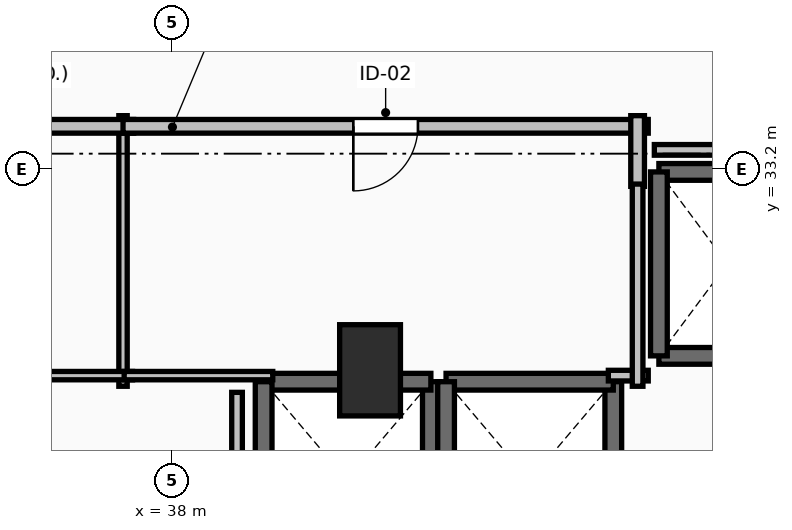
"""IFC4 building model, lengths in metres.
Left out: names, types, materials, properties, quantities, classifications, styles, units other than length and angle.
Written with IfcOpenShell. Run it as: python <this file> out.ifc"""

import sys

from ifc_helpers import new_model, si_unit, direction, frame, frame_2d, origin, origin_2d, place, context, subcontext, project, spatial, rectangle, extrude, element, fill, save


model = new_model("IFC4")
c1 = context("Model", 3, precision=1e-05, world=origin(), true_north=direction((0.0, 1.0)))
c2 = subcontext(c1, "Body", "Model", "MODEL_VIEW")
j1 = project(units=[si_unit("LENGTHUNIT", "METRE"), si_unit("PLANEANGLEUNIT", "RADIAN")], contexts=[c1])
p1 = place(None, origin())
s1 = spatial("IfcSite", under=j1, at=p1, CompositionType="ELEMENT")
p2 = place(p1, origin())
s2 = spatial("IfcBuilding", under=s1, at=p2, CompositionType="ELEMENT")
p3 = place(p2, frame((0.0, 0.0, 150.1)))
s3 = spatial("IfcBuildingStorey", under=s2, at=p3, CompositionType="ELEMENT", Elevation=150.1)
p4 = place(p3, frame((40.6, 30.55, 0.0), z_axis=(0.0, 0.0, 1.0), x_axis=(1.0, 0.0, 0.0)))
e1 = element("IfcColumn", 1, at=p4, inside=s3, PredefinedType="PILASTER", context=c2, shape_type="SweptSolid", body=[
    extrude(rectangle(XDim=0.8, YDim=1.2, at=origin_2d()), origin(), (0.0, 0.0, 1.0), 3.5),
])
p5 = place(p3, frame((41.4, 27.8, 0.0), z_axis=(0.0, 0.0, 1.0), x_axis=(0.0, 1.0, 0.0)))
e2 = element("IfcWall", 2, at=p5, inside=s3, PredefinedType="SOLIDWALL", context=c2, shape_type="SweptSolid", body=[
    extrude(rectangle(XDim=2.6, YDim=0.22, at=frame_2d((1.3, 0.0))), origin(), (0.0, 0.0, 1.0), 3.24),
])
p6 = place(p3, frame((41.4, 30.4, 0.0), z_axis=(0.0, 0.0, 1.0), x_axis=(-1.0, 0.0, 0.0)))
e3 = element("IfcWall", 3, at=p6, inside=s3, PredefinedType="SOLIDWALL", context=c2, shape_type="SweptSolid", body=[
    extrude(rectangle(XDim=2.2, YDim=0.22, at=frame_2d((1.1, 0.0))), origin(), (0.0, 0.0, 1.0), 3.24),
])
for number, where, z_axis, x_axis in (
    (4, (39.2, 30.4, 0.0), (0.0, 0.0, 1.0), (0.0, -1.0, 0.0)),
    (5, (43.8, 27.8, 0.0), (0.0, 0.0, 1.0), (0.0, 1.0, 0.0)),
):
    element("IfcWall", number, at=place(p3, frame(where, z_axis=z_axis, x_axis=x_axis)), inside=s3, PredefinedType="SOLIDWALL", context=c2, shape_type="SweptSolid", body=[
        extrude(rectangle(XDim=2.6, YDim=0.22, at=frame_2d((1.3, 0.0))), origin(), (0.0, 0.0, 1.0), 3.24),
    ])
p7 = place(p3, frame((43.8, 30.4, 0.0), z_axis=(0.0, 0.0, 1.0), x_axis=(-1.0, 0.0, 0.0)))
e6 = element("IfcWall", 6, at=p7, inside=s3, PredefinedType="SOLIDWALL", context=c2, shape_type="SweptSolid", body=[
    extrude(rectangle(XDim=2.2, YDim=0.22, at=frame_2d((1.1, 0.0))), origin(), (0.0, 0.0, 1.0), 3.24),
])
p8 = place(p3, frame((41.6, 30.4, 0.0), z_axis=(0.0, 0.0, 1.0), x_axis=(0.0, -1.0, 0.0)))
e7 = element("IfcWall", 7, at=p8, inside=s3, PredefinedType="SOLIDWALL", context=c2, shape_type="SweptSolid", body=[
    extrude(rectangle(XDim=2.6, YDim=0.22, at=frame_2d((1.3, 0.0))), origin(), (0.0, 0.0, 1.0), 3.24),
])
for number, where, z_axis, x_axis in (
    (8, (44.4, 30.74, 0.0), (0.0, 0.0, 1.0), (1.0, 0.0, 0.0)),
    (9, (46.2, 33.16, 0.0), (0.0, 0.0, 1.0), (-1.0, 0.0, 0.0)),
):
    element("IfcWall", number, at=place(p3, frame(where, z_axis=z_axis, x_axis=x_axis)), inside=s3, PredefinedType="SOLIDWALL", context=c2, shape_type="SweptSolid", body=[
        extrude(rectangle(XDim=1.8, YDim=0.22, at=frame_2d((0.9, 0.0))), origin(), (0.0, 0.0, 1.0), 3.24),
    ])
p9 = place(p3, frame((44.4, 33.16, 0.0), z_axis=(0.0, 0.0, 1.0), x_axis=(0.0, -1.0, 0.0)))
e10 = element("IfcWall", 10, at=p9, inside=s3, PredefinedType="SOLIDWALL", context=c2, shape_type="SweptSolid", body=[
    extrude(rectangle(XDim=2.42, YDim=0.22, at=frame_2d((1.21, 0.0))), origin(), (0.0, 0.0, 1.0), 3.24),
])
p10 = place(p3, frame((37.35, 30.34, 0.0), z_axis=(0.0, 0.0, 1.0), x_axis=(0.0, 1.0, 0.0)))
e11 = element("IfcWall", 11, at=p10, inside=s3, PredefinedType="PARTITIONING", context=c2, shape_type="SweptSolid", body=[
    extrude(rectangle(XDim=3.56, YDim=0.11, at=frame_2d((1.78, 0.0))), origin(), (0.0, 0.0, 1.0), 2.432),
])
p11 = place(p3, frame((33.36, 30.48, 0.0), z_axis=(0.0, 0.0, 1.0), x_axis=(1.0, 0.0, 0.0)))
e12 = element("IfcWall", 12, at=p11, inside=s3, PredefinedType="PARTITIONING", context=c2, shape_type="SweptSolid", body=[
    extrude(rectangle(XDim=4.115, YDim=0.11, at=frame_2d((2.058, 0.0))), origin(), (0.0, 0.0, 1.0), 2.432),
])
p12 = place(p3, frame((37.49, 33.76, 0.0), z_axis=(0.0, 0.0, 1.0), x_axis=(-1.0, 0.0, 0.0)))
e13 = element("IfcWall", 13, at=p12, inside=s3, PredefinedType="PARTITIONING", context=c2, shape_type="SweptSolid", body=[
    extrude(rectangle(XDim=4.13, YDim=0.18, at=frame_2d((2.065, 0.0))), origin(), (0.0, 0.0, 1.0), 3.24),
])
p13 = place(p12, frame((1.64, 0.0, 0.0)))
e14 = element("IfcOpeningElement", 14, at=p13, cuts=e13, PredefinedType="OPENING", context=c2, shape_type="SweptSolid", body=[
    extrude(rectangle(XDim=0.85, YDim=2.1, at=frame_2d((0.425, 1.05))), frame((0.0, 0.105, 0.0), z_axis=(0.0, -1.0, 0.0), x_axis=(1.0, 0.0, 0.0)), (0.0, 0.0, 1.0), 0.21),
])
p14 = place(p3, frame((37.365, 30.48, 0.0), z_axis=(0.0, 0.0, 1.0), x_axis=(1.0, 0.0, 0.0)))
e15 = element("IfcWall", 15, at=p14, inside=s3, PredefinedType="PARTITIONING", context=c2, shape_type="SweptSolid", body=[
    extrude(rectangle(XDim=1.955, YDim=0.11, at=frame_2d((0.978, 0.0))), origin(), (0.0, 0.0, 1.0), 2.432),
])
p15 = place(p3, frame((44.26, 33.76, 0.0), z_axis=(0.0, 0.0, 1.0), x_axis=(-1.0, 0.0, 0.0)))
e16 = element("IfcWall", 16, at=p15, inside=s3, PredefinedType="PARTITIONING", context=c2, shape_type="SweptSolid", body=[
    extrude(rectangle(XDim=6.91, YDim=0.18, at=frame_2d((3.455, 0.0))), origin(), (0.0, 0.0, 1.0), 3.24),
])
p16 = place(p15, frame((3.03, 0.0, 0.0)))
e17 = element("IfcOpeningElement", 17, at=p16, cuts=e16, PredefinedType="OPENING", context=c2, shape_type="SweptSolid", body=[
    extrude(rectangle(XDim=0.85, YDim=2.1, at=frame_2d((0.425, 1.05))), frame((0.0, 0.105, 0.0), z_axis=(0.0, -1.0, 0.0), x_axis=(1.0, 0.0, 0.0)), (0.0, 0.0, 1.0), 0.21),
])
p17 = place(p3, frame((44.12, 32.97, 0.0), z_axis=(0.0, 0.0, 1.0), x_axis=(0.0, 1.0, 0.0)))
e18 = element("IfcWall", 18, at=p17, inside=s3, PredefinedType="PARTITIONING", context=c2, shape_type="SweptSolid", body=[
    extrude(rectangle(XDim=0.93, YDim=0.18, at=frame_2d((0.465, 0.0))), origin(), (0.0, 0.0, 1.0), 3.24),
])
p18 = place(p3, frame((43.735, 30.48, 0.0), z_axis=(0.0, 0.0, 1.0), x_axis=(1.0, 0.0, 0.0)))
e19 = element("IfcWall", 19, at=p18, inside=s3, PredefinedType="PARTITIONING", context=c2, shape_type="SweptSolid", body=[
    extrude(rectangle(XDim=0.525, YDim=0.14, at=frame_2d((0.262, 0.0))), origin(), (0.0, 0.0, 1.0), 3.24),
])
p19 = place(p3, frame((44.12, 30.34, 0.0), z_axis=(0.0, 0.0, 1.0), x_axis=(0.0, 1.0, 0.0)))
e20 = element("IfcWall", 20, at=p19, inside=s3, PredefinedType="PARTITIONING", context=c2, shape_type="SweptSolid", body=[
    extrude(rectangle(XDim=2.66, YDim=0.14, at=frame_2d((1.33, 0.0))), origin(), (0.0, 0.0, 1.0), 3.24),
])
p20 = place(p3, frame((38.85, 27.87, 0.0), z_axis=(0.0, 0.0, 1.0), x_axis=(0.0, 1.0, 0.0)))
e21 = element("IfcWall", 21, at=p20, inside=s3, PredefinedType="PARTITIONING", context=c2, shape_type="SweptSolid", body=[
    extrude(rectangle(XDim=2.39, YDim=0.14, at=frame_2d((1.195, 0.0))), origin(), (0.0, 0.0, 1.0), 3.24),
])
p21 = place(p3, frame((48.55, 33.45, 0.0), z_axis=(0.0, 0.0, 1.0), x_axis=(-1.0, 0.0, 0.0)))
e22 = element("IfcWall", 22, at=p21, inside=s3, PredefinedType="PARTITIONING", context=c2, shape_type="SweptSolid", body=[
    extrude(rectangle(XDim=4.21, YDim=0.14, at=frame_2d((2.105, 0.0))), origin(), (0.0, 0.0, 1.0), 2.432),
])
p22 = place(p16, origin())
e23 = element("IfcDoor", 23, at=p22, inside=s3, OperationType="SINGLE_SWING_RIGHT", PredefinedType="DOOR", context=c2, shape_type="SweptSolid", body=[
    extrude(rectangle(XDim=0.85, YDim=2.1, at=frame_2d((0.425, 1.05))), frame((0.0, 0.025, 0.0), z_axis=(0.0, -1.0, 0.0), x_axis=(1.0, 0.0, 0.0)), (0.0, 0.0, 1.0), 0.05),
])
fill(e17, e23)
save(model, sys.argv[1])
